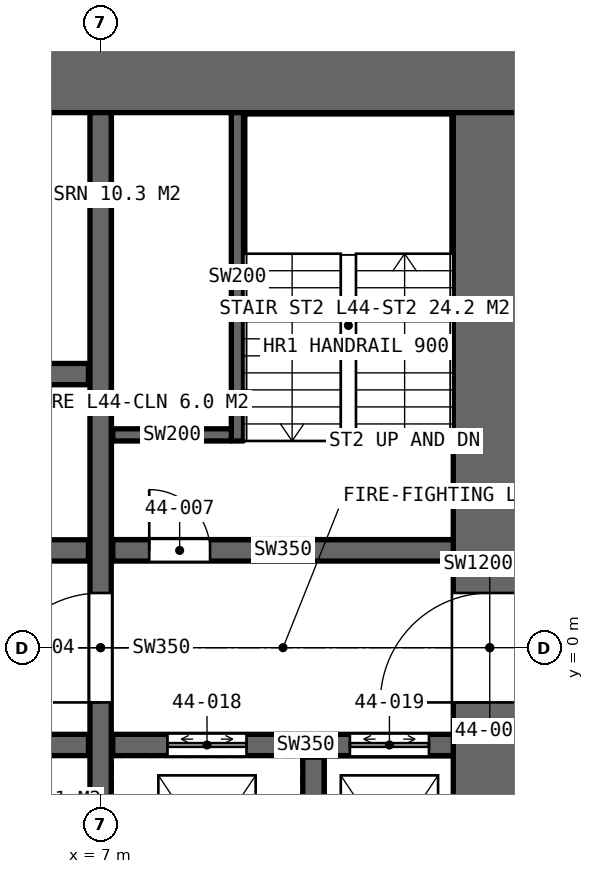
"""IFC4 building model, lengths in metres.
Left out: names, types, materials, properties, quantities, classifications, styles, units other than length and angle.
Written with IfcOpenShell. Run it as: python <this file> out.ifc"""

import sys

from ifc_helpers import new_model, si_unit, direction, frame, frame_2d, origin, place, context, subcontext, project, spatial, rectangle, extrude, element, fill, save


model = new_model("IFC4")
c1 = context("Model", 3, precision=1e-05, world=origin(), true_north=direction((0.0, 1.0)))
c2 = subcontext(c1, "Body", "Model", "MODEL_VIEW")
j1 = project(units=[si_unit("LENGTHUNIT", "METRE"), si_unit("PLANEANGLEUNIT", "RADIAN")], contexts=[c1])
p1 = place(None, origin())
s1 = spatial("IfcSite", under=j1, at=p1, CompositionType="ELEMENT")
p2 = place(p1, origin())
s2 = spatial("IfcBuilding", under=s1, at=p2, CompositionType="ELEMENT")
p3 = place(p2, frame((0.0, 0.0, 203.2)))
s3 = spatial("IfcBuildingStorey", under=s2, at=p3, CompositionType="ELEMENT", Elevation=203.2)
p4 = place(p3, frame((14.0, 9.4, 0.0), z_axis=(0.0, 0.0, 1.0), x_axis=(-1.0, 0.0, 0.0)))
e1 = element("IfcWall", 1, at=p4, inside=s3, PredefinedType="SHEAR", context=c2, shape_type="SweptSolid", body=[
    extrude(rectangle(XDim=28.0, YDim=1.2, at=frame_2d((14.0, 0.0))), origin(), (0.0, 0.0, 1.0), 4.2),
])
p5 = place(p4, frame((24.0, 0.0, 0.0)))
e2 = element("IfcOpeningElement", 2, at=p5, cuts=e1, PredefinedType="OPENING", context=c2, shape_type="SweptSolid", body=[
    extrude(rectangle(XDim=1.0, YDim=2.4, at=frame_2d((0.5, 1.2))), frame((0.0, 0.61, 0.0), z_axis=(0.0, -1.0, 0.0), x_axis=(1.0, 0.0, 0.0)), (0.0, 0.0, 1.0), 1.22),
])
p6 = place(p3, frame((13.4, -8.8, 0.0), z_axis=(0.0, 0.0, 1.0), x_axis=(0.0, 1.0, 0.0)))
e3 = element("IfcWall", 3, at=p6, inside=s3, PredefinedType="SHEAR", context=c2, shape_type="SweptSolid", body=[
    extrude(rectangle(XDim=17.6, YDim=1.2, at=frame_2d((8.8, 0.0))), origin(), (0.0, 0.0, 1.0), 4.2),
])
p7 = place(p6, frame((7.9, 0.0, 0.0)))
e4 = element("IfcOpeningElement", 4, at=p7, cuts=e3, PredefinedType="OPENING", context=c2, shape_type="SweptSolid", body=[
    extrude(rectangle(XDim=1.8, YDim=2.4, at=frame_2d((0.9, 1.2))), frame((0.0, 0.61, 0.0), z_axis=(0.0, -1.0, 0.0), x_axis=(1.0, 0.0, 0.0)), (0.0, 0.0, 1.0), 1.22),
])
p8 = place(p3, frame((7.0, -8.8, 0.0), z_axis=(0.0, 0.0, 1.0), x_axis=(0.0, 1.0, 0.0)))
e5 = element("IfcWall", 5, at=p8, inside=s3, PredefinedType="SHEAR", context=c2, shape_type="SweptSolid", body=[
    extrude(rectangle(XDim=17.6, YDim=0.35, at=frame_2d((8.8, 0.0))), origin(), (0.0, 0.0, 1.0), 4.2),
])
p9 = place(p8, frame((7.9, 0.0, 0.0)))
e6 = element("IfcOpeningElement", 6, at=p9, cuts=e5, PredefinedType="OPENING", context=c2, shape_type="SweptSolid", body=[
    extrude(rectangle(XDim=1.8, YDim=2.4, at=frame_2d((0.9, 1.2))), frame((0.0, 0.185, 0.0), z_axis=(0.0, -1.0, 0.0), x_axis=(1.0, 0.0, 0.0)), (0.0, 0.0, 1.0), 0.37),
])
p10 = place(p3, frame((-6.8, 1.6, 0.0), z_axis=(0.0, 0.0, 1.0), x_axis=(1.0, 0.0, 0.0)))
e7 = element("IfcWall", 7, at=p10, inside=s3, PredefinedType="SHEAR", context=c2, shape_type="SweptSolid", body=[
    extrude(rectangle(XDim=13.6, YDim=0.35, at=frame_2d((6.8, 0.0))), origin(), (0.0, 0.0, 1.0), 4.2),
])
p11 = place(p10, frame((11.95, 0.0, 0.0)))
e8 = element("IfcOpeningElement", 8, at=p11, cuts=e7, PredefinedType="OPENING", context=c2, shape_type="SweptSolid", body=[
    extrude(rectangle(XDim=0.9, YDim=2.4, at=frame_2d((0.45, 1.2))), frame((0.0, 0.185, 0.0), z_axis=(0.0, -1.0, 0.0), x_axis=(1.0, 0.0, 0.0)), (0.0, 0.0, 1.0), 0.37),
])
p12 = place(p10, frame((4.5, 0.0, 0.0)))
e9 = element("IfcOpeningElement", 9, at=p12, cuts=e7, PredefinedType="OPENING", context=c2, shape_type="SweptSolid", body=[
    extrude(rectangle(XDim=1.8, YDim=2.4, at=frame_2d((0.9, 1.2))), frame((0.0, 0.185, 0.0), z_axis=(0.0, -1.0, 0.0), x_axis=(1.0, 0.0, 0.0)), (0.0, 0.0, 1.0), 0.37),
])
p13 = place(p3, frame((-6.8, -1.6, 0.0), z_axis=(0.0, 0.0, 1.0), x_axis=(1.0, 0.0, 0.0)))
e10 = element("IfcWall", 10, at=p13, inside=s3, PredefinedType="SHEAR", context=c2, shape_type="SweptSolid", body=[
    extrude(rectangle(XDim=13.6, YDim=0.35, at=frame_2d((6.8, 0.0))), origin(), (0.0, 0.0, 1.0), 4.2),
])
p14 = place(p13, frame((0.715, 0.0, 0.0)))
e11 = element("IfcOpeningElement", 11, at=p14, cuts=e10, PredefinedType="OPENING", context=c2, shape_type="SweptSolid", body=[
    extrude(rectangle(XDim=1.1, YDim=2.4, at=frame_2d((0.55, 1.2))), frame((0.0, 0.185, 0.0), z_axis=(0.0, -1.0, 0.0), x_axis=(1.0, 0.0, 0.0)), (0.0, 0.0, 1.0), 0.37),
])
p15 = place(p13, frame((5.0, 0.0, 0.0)))
e12 = element("IfcOpeningElement", 12, at=p15, cuts=e10, PredefinedType="OPENING", context=c2, shape_type="SweptSolid", body=[
    extrude(rectangle(XDim=1.0, YDim=2.4, at=frame_2d((0.5, 1.2))), frame((0.0, 0.185, 0.0), z_axis=(0.0, -1.0, 0.0), x_axis=(1.0, 0.0, 0.0)), (0.0, 0.0, 1.0), 0.37),
])
p16 = place(p13, frame((9.135, 0.0, 0.0)))
e13 = element("IfcOpeningElement", 13, at=p16, cuts=e10, PredefinedType="OPENING", context=c2, shape_type="SweptSolid", body=[
    extrude(rectangle(XDim=1.0, YDim=2.4, at=frame_2d((0.5, 1.2))), frame((0.0, 0.185, 0.0), z_axis=(0.0, -1.0, 0.0), x_axis=(1.0, 0.0, 0.0)), (0.0, 0.0, 1.0), 0.37),
])
p17 = place(p13, frame((11.9, 0.0, 0.0)))
e14 = element("IfcOpeningElement", 14, at=p17, cuts=e10, PredefinedType="OPENING", context=c2, shape_type="SweptSolid", body=[
    extrude(rectangle(XDim=1.0, YDim=2.4, at=frame_2d((0.5, 1.2))), frame((0.0, 0.185, 0.0), z_axis=(0.0, -1.0, 0.0), x_axis=(1.0, 0.0, 0.0)), (0.0, 0.0, 1.0), 0.37),
])
p18 = place(p3, frame((-6.8, 4.5, 0.0), z_axis=(0.0, 0.0, 1.0), x_axis=(1.0, 0.0, 0.0)))
e15 = element("IfcWall", 15, at=p18, inside=s3, PredefinedType="SHEAR", context=c2, shape_type="SweptSolid", body=[
    extrude(rectangle(XDim=13.6, YDim=0.35, at=frame_2d((6.8, 0.0))), origin(), (0.0, 0.0, 1.0), 4.2),
])
p19 = place(p18, frame((0.7, 0.0, 0.0)))
e16 = element("IfcOpeningElement", 16, at=p19, cuts=e15, PredefinedType="OPENING", context=c2, shape_type="SweptSolid", body=[
    extrude(rectangle(XDim=1.1, YDim=2.4, at=frame_2d((0.55, 1.2))), frame((0.0, 0.185, 0.0), z_axis=(0.0, -1.0, 0.0), x_axis=(1.0, 0.0, 0.0)), (0.0, 0.0, 1.0), 0.37),
])
p20 = place(p18, frame((3.5, 0.0, 0.0)))
e17 = element("IfcOpeningElement", 17, at=p20, cuts=e15, PredefinedType="OPENING", context=c2, shape_type="SweptSolid", body=[
    extrude(rectangle(XDim=1.1, YDim=2.4, at=frame_2d((0.55, 1.2))), frame((0.0, 0.185, 0.0), z_axis=(0.0, -1.0, 0.0), x_axis=(1.0, 0.0, 0.0)), (0.0, 0.0, 1.0), 0.37),
])
p21 = place(p18, frame((6.3, 0.0, 0.0)))
e18 = element("IfcOpeningElement", 18, at=p21, cuts=e15, PredefinedType="OPENING", context=c2, shape_type="SweptSolid", body=[
    extrude(rectangle(XDim=1.1, YDim=2.4, at=frame_2d((0.55, 1.2))), frame((0.0, 0.185, 0.0), z_axis=(0.0, -1.0, 0.0), x_axis=(1.0, 0.0, 0.0)), (0.0, 0.0, 1.0), 0.37),
])
p22 = place(p18, frame((9.1, 0.0, 0.0)))
e19 = element("IfcOpeningElement", 19, at=p22, cuts=e15, PredefinedType="OPENING", context=c2, shape_type="SweptSolid", body=[
    extrude(rectangle(XDim=1.1, YDim=2.4, at=frame_2d((0.55, 1.2))), frame((0.0, 0.185, 0.0), z_axis=(0.0, -1.0, 0.0), x_axis=(1.0, 0.0, 0.0)), (0.0, 0.0, 1.0), 0.37),
])
p23 = place(p3, frame((7.2, 1.6, 0.0), z_axis=(0.0, 0.0, 1.0), x_axis=(1.0, 0.0, 0.0)))
e20 = element("IfcWall", 20, at=p23, inside=s3, PredefinedType="SHEAR", context=c2, shape_type="SweptSolid", body=[
    extrude(rectangle(XDim=5.6, YDim=0.35, at=frame_2d((2.8, 0.0))), origin(), (0.0, 0.0, 1.0), 4.2),
])
p24 = place(p23, frame((0.6, 0.0, 0.0)))
e21 = element("IfcOpeningElement", 21, at=p24, cuts=e20, PredefinedType="OPENING", context=c2, shape_type="SweptSolid", body=[
    extrude(rectangle(XDim=1.0, YDim=2.4, at=frame_2d((0.5, 1.2))), frame((0.0, 0.185, 0.0), z_axis=(0.0, -1.0, 0.0), x_axis=(1.0, 0.0, 0.0)), (0.0, 0.0, 1.0), 0.37),
])
p25 = place(p3, frame((7.2, -1.6, 0.0), z_axis=(0.0, 0.0, 1.0), x_axis=(1.0, 0.0, 0.0)))
e22 = element("IfcWall", 22, at=p25, inside=s3, PredefinedType="SHEAR", context=c2, shape_type="SweptSolid", body=[
    extrude(rectangle(XDim=5.6, YDim=0.35, at=frame_2d((2.8, 0.0))), origin(), (0.0, 0.0, 1.0), 4.2),
])
p26 = place(p25, frame((0.9, 0.0, 0.0)))
e23 = element("IfcOpeningElement", 23, at=p26, cuts=e22, PredefinedType="OPENING", context=c2, shape_type="SweptSolid", body=[
    extrude(rectangle(XDim=1.3, YDim=2.4, at=frame_2d((0.65, 1.2))), frame((0.0, 0.185, 0.0), z_axis=(0.0, -1.0, 0.0), x_axis=(1.0, 0.0, 0.0)), (0.0, 0.0, 1.0), 0.37),
])
p27 = place(p25, frame((3.9, 0.0, 0.0)))
e24 = element("IfcOpeningElement", 24, at=p27, cuts=e22, PredefinedType="OPENING", context=c2, shape_type="SweptSolid", body=[
    extrude(rectangle(XDim=1.3, YDim=2.4, at=frame_2d((0.65, 1.2))), frame((0.0, 0.185, 0.0), z_axis=(0.0, -1.0, 0.0), x_axis=(1.0, 0.0, 0.0)), (0.0, 0.0, 1.0), 0.37),
])
p28 = place(p3, frame((10.5, -4.8, 0.0), z_axis=(0.0, 0.0, 1.0), x_axis=(0.0, 1.0, 0.0)))
e25 = element("IfcWall", 25, at=p28, inside=s3, PredefinedType="SHEAR", context=c2, shape_type="SweptSolid", body=[
    extrude(rectangle(XDim=3.0, YDim=0.35, at=frame_2d((1.5, 0.0))), origin(), (0.0, 0.0, 1.0), 4.2),
])
p29 = place(p3, frame((9.25, 3.4, 0.0), z_axis=(0.0, 0.0, 1.0), x_axis=(0.0, 1.0, 0.0)))
e26 = element("IfcWall", 26, at=p29, inside=s3, PredefinedType="SOLIDWALL", context=c2, shape_type="SweptSolid", body=[
    extrude(rectangle(XDim=5.4, YDim=0.2, at=frame_2d((2.7, 0.0))), origin(), (0.0, 0.0, 1.0), 4.2),
])
p30 = place(p3, frame((9.15, 3.5, 0.0), z_axis=(0.0, 0.0, 1.0), x_axis=(-1.0, 0.0, 0.0)))
e27 = element("IfcWall", 27, at=p30, inside=s3, PredefinedType="SOLIDWALL", context=c2, shape_type="SweptSolid", body=[
    extrude(rectangle(XDim=1.95, YDim=0.2, at=frame_2d((0.975, 0.0))), origin(), (0.0, 0.0, 1.0), 4.2),
])
p31 = place(p7, origin())
e28 = element("IfcDoor", 28, at=p31, inside=s3, OperationType="DOUBLE_DOOR_SINGLE_SWING", PredefinedType="DOOR", context=c2, shape_type="SweptSolid", body=[
    extrude(rectangle(XDim=1.8, YDim=2.4, at=frame_2d((0.9, 1.2))), frame((0.0, 0.025, 0.0), z_axis=(0.0, -1.0, 0.0), x_axis=(1.0, 0.0, 0.0)), (0.0, 0.0, 1.0), 0.05),
])
fill(e4, e28)
p32 = place(p9, origin())
e29 = element("IfcDoor", 29, at=p32, inside=s3, OperationType="DOUBLE_DOOR_SINGLE_SWING", PredefinedType="DOOR", context=c2, shape_type="SweptSolid", body=[
    extrude(rectangle(XDim=1.8, YDim=2.4, at=frame_2d((0.9, 1.2))), frame((0.0, 0.025, 0.0), z_axis=(0.0, -1.0, 0.0), x_axis=(1.0, 0.0, 0.0)), (0.0, 0.0, 1.0), 0.05),
])
fill(e6, e29)
p33 = place(p24, origin())
e30 = element("IfcDoor", 30, at=p33, inside=s3, OperationType="SINGLE_SWING_LEFT", PredefinedType="DOOR", context=c2, shape_type="SweptSolid", body=[
    extrude(rectangle(XDim=1.0, YDim=2.4, at=frame_2d((0.5, 1.2))), frame((0.0, 0.025, 0.0), z_axis=(0.0, -1.0, 0.0), x_axis=(1.0, 0.0, 0.0)), (0.0, 0.0, 1.0), 0.05),
])
fill(e21, e30)
p34 = place(p26, origin())
e31 = element("IfcDoor", 31, at=p34, inside=s3, OperationType="DOUBLE_DOOR_SLIDING", PredefinedType="DOOR", context=c2, shape_type="SweptSolid", body=[
    extrude(rectangle(XDim=1.3, YDim=2.4, at=frame_2d((0.65, 1.2))), frame((0.0, 0.025, 0.0), z_axis=(0.0, -1.0, 0.0), x_axis=(1.0, 0.0, 0.0)), (0.0, 0.0, 1.0), 0.05),
])
fill(e23, e31)
p35 = place(p27, origin())
e32 = element("IfcDoor", 32, at=p35, inside=s3, OperationType="DOUBLE_DOOR_SLIDING", PredefinedType="DOOR", context=c2, shape_type="SweptSolid", body=[
    extrude(rectangle(XDim=1.3, YDim=2.4, at=frame_2d((0.65, 1.2))), frame((0.0, 0.025, 0.0), z_axis=(0.0, -1.0, 0.0), x_axis=(1.0, 0.0, 0.0)), (0.0, 0.0, 1.0), 0.05),
])
fill(e24, e32)
save(model, sys.argv[1])
